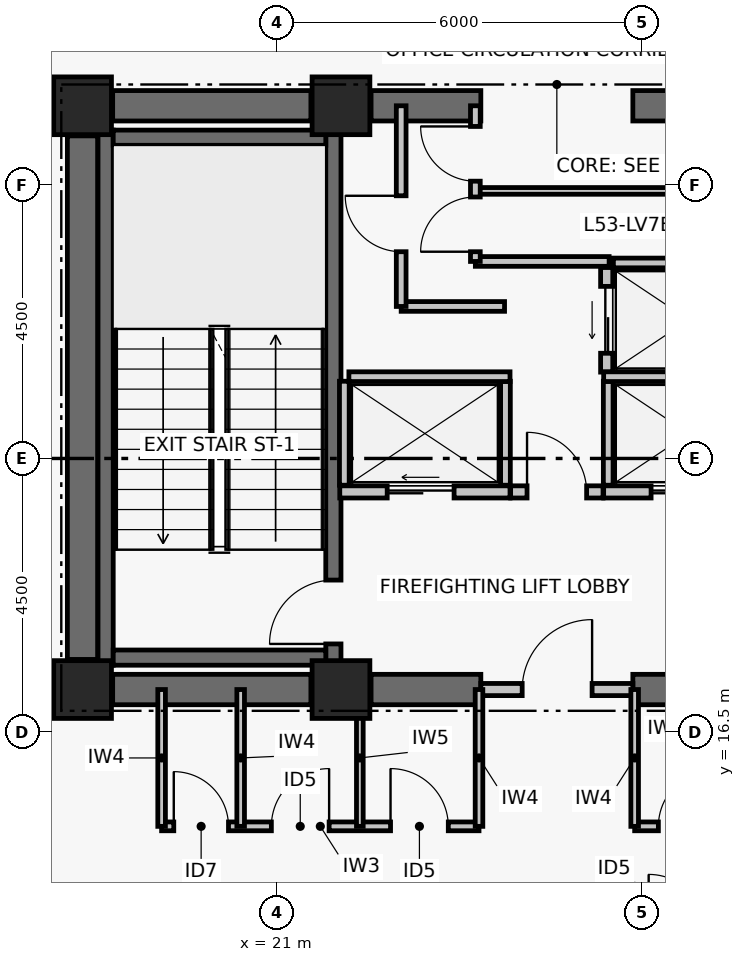
"""IFC4 building model, lengths in metres.
Left out: names, types, materials, properties, quantities, classifications, styles, units other than length and angle.
Written with IfcOpenShell. Run it as: python <this file> out.ifc"""

import sys

from ifc_helpers import new_model, si_unit, direction, frame, frame_2d, origin, origin_2d, place, context, subcontext, project, spatial, rectangle, extrude, element, fill, save


model = new_model("IFC4")
c1 = context("Model", 3, precision=1e-05, world=origin(), true_north=direction((0.0, 1.0)))
c2 = subcontext(c1, "Body", "Model", "MODEL_VIEW")
j1 = project(units=[si_unit("LENGTHUNIT", "METRE"), si_unit("PLANEANGLEUNIT", "RADIAN")], contexts=[c1])
p1 = place(None, origin())
s1 = spatial("IfcSite", under=j1, at=p1, CompositionType="ELEMENT")
p2 = place(p1, origin())
s2 = spatial("IfcBuilding", under=s1, at=p2, CompositionType="ELEMENT")
p3 = place(p2, frame((0.0, 0.0, 210.12)))
s3 = spatial("IfcBuildingStorey", under=s2, at=p3, CompositionType="ELEMENT", Elevation=210.12)
for number, where, z_axis, x_axis in (
    (1, (17.8, 17.2, 0.0), (0.0, 0.0, 1.0), (1.0, 0.0, 0.0)),
    (2, (22.05, 17.2, 0.0), (0.0, 0.0, 1.0), (1.0, 0.0, 0.0)),
    (3, (17.8, 26.8, 0.0), (0.0, 0.0, 1.0), (1.0, 0.0, 0.0)),
    (4, (22.05, 26.8, 0.0), (0.0, 0.0, 1.0), (1.0, 0.0, 0.0)),
):
    element("IfcColumn", number, at=place(p3, frame(where, z_axis=z_axis, x_axis=x_axis)), inside=s3, PredefinedType="COLUMN", context=c2, shape_type="SweptSolid", body=[
        extrude(rectangle(XDim=0.95, YDim=0.95, at=origin_2d()), origin(), (0.0, 0.0, 1.0), 3.72),
    ])
p4 = place(p3, frame((18.295, 17.2, 0.0), z_axis=(0.0, 0.0, 1.0), x_axis=(1.0, 0.0, 0.0)))
e5 = element("IfcWall", 5, at=p4, inside=s3, PredefinedType="SHEAR", context=c2, shape_type="SweptSolid", body=[
    extrude(rectangle(XDim=3.26, YDim=0.5, at=frame_2d((1.63, 0.0))), origin(), (0.0, 0.0, 1.0), 3.38),
])
p5 = place(p3, frame((22.545, 17.2, 0.0), z_axis=(0.0, 0.0, 1.0), x_axis=(1.0, 0.0, 0.0)))
e6 = element("IfcWall", 6, at=p5, inside=s3, PredefinedType="SHEAR", context=c2, shape_type="SweptSolid", body=[
    extrude(rectangle(XDim=1.805, YDim=0.5, at=frame_2d((0.903, 0.0))), origin(), (0.0, 0.0, 1.0), 3.38),
])
p6 = place(p3, frame((26.85, 17.2, 0.0), z_axis=(0.0, 0.0, 1.0), x_axis=(1.0, 0.0, 0.0)))
e7 = element("IfcWall", 7, at=p6, inside=s3, PredefinedType="SHEAR", context=c2, shape_type="SweptSolid", body=[
    extrude(rectangle(XDim=1.805, YDim=0.5, at=frame_2d((0.902, 0.0))), origin(), (0.0, 0.0, 1.0), 3.38),
])
p7 = place(p3, frame((18.295, 26.8, 0.0), z_axis=(0.0, 0.0, 1.0), x_axis=(1.0, 0.0, 0.0)))
e8 = element("IfcWall", 8, at=p7, inside=s3, PredefinedType="SHEAR", context=c2, shape_type="SweptSolid", body=[
    extrude(rectangle(XDim=3.26, YDim=0.5, at=frame_2d((1.63, 0.0))), origin(), (0.0, 0.0, 1.0), 3.38),
])
p8 = place(p3, frame((22.545, 26.8, 0.0), z_axis=(0.0, 0.0, 1.0), x_axis=(1.0, 0.0, 0.0)))
e9 = element("IfcWall", 9, at=p8, inside=s3, PredefinedType="SHEAR", context=c2, shape_type="SweptSolid", body=[
    extrude(rectangle(XDim=1.805, YDim=0.5, at=frame_2d((0.903, 0.0))), origin(), (0.0, 0.0, 1.0), 3.38),
])
p9 = place(p3, frame((26.85, 26.8, 0.0), z_axis=(0.0, 0.0, 1.0), x_axis=(1.0, 0.0, 0.0)))
e10 = element("IfcWall", 10, at=p9, inside=s3, PredefinedType="SHEAR", context=c2, shape_type="SweptSolid", body=[
    extrude(rectangle(XDim=1.805, YDim=0.5, at=frame_2d((0.902, 0.0))), origin(), (0.0, 0.0, 1.0), 3.38),
])
p10 = place(p3, frame((17.8, 17.695, 0.0), z_axis=(0.0, 0.0, 1.0), x_axis=(0.0, 1.0, 0.0)))
e11 = element("IfcWall", 11, at=p10, inside=s3, PredefinedType="SHEAR", context=c2, shape_type="SweptSolid", body=[
    extrude(rectangle(XDim=8.61, YDim=0.5, at=frame_2d((4.305, 0.0))), origin(), (0.0, 0.0, 1.0), 3.38),
])
p11 = place(p3, frame((18.179, 17.6, 0.0), z_axis=(0.0, 0.0, 1.0), x_axis=(0.0, 1.0, 0.0)))
e12 = element("IfcWall", 12, at=p11, inside=s3, PredefinedType="SHEAR", context=c2, shape_type="SweptSolid", body=[
    extrude(rectangle(XDim=8.8, YDim=0.25, at=frame_2d((4.4, 0.0))), origin(), (0.0, 0.0, 1.0), 3.38),
])
p12 = place(p3, frame((21.925, 17.6, 0.0), z_axis=(0.0, 0.0, 1.0), x_axis=(0.0, 1.0, 0.0)))
e13 = element("IfcWall", 13, at=p12, inside=s3, PredefinedType="SHEAR", context=c2, shape_type="SweptSolid", body=[
    extrude(rectangle(XDim=8.8, YDim=0.25, at=frame_2d((4.4, 0.0))), origin(), (0.0, 0.0, 1.0), 3.38),
])
p13 = place(p12, frame((0.35, 0.0, 0.0)))
e14 = element("IfcOpeningElement", 14, at=p13, cuts=e13, PredefinedType="OPENING", context=c2, shape_type="SweptSolid", body=[
    extrude(rectangle(XDim=1.05, YDim=2.08, at=frame_2d((0.525, 1.04))), frame((0.0, 0.135, 0.0), z_axis=(0.0, -1.0, 0.0), x_axis=(1.0, 0.0, 0.0)), (0.0, 0.0, 1.0), 0.27),
])
for number, where, z_axis, x_axis in (
    (15, (18.304, 17.725, 0.0), (0.0, 0.0, 1.0), (1.0, 0.0, 0.0)),
    (16, (18.304, 26.275, 0.0), (0.0, 0.0, 1.0), (1.0, 0.0, 0.0)),
):
    element("IfcWall", number, at=place(p3, frame(where, z_axis=z_axis, x_axis=x_axis)), inside=s3, PredefinedType="SHEAR", context=c2, shape_type="SweptSolid", body=[
        extrude(rectangle(XDim=3.496, YDim=0.25, at=frame_2d((1.748, 0.0))), origin(), (0.0, 0.0, 1.0), 3.38),
    ])
p14 = place(p3, frame((24.35, 17.2, 0.0), z_axis=(0.0, 0.0, 1.0), x_axis=(1.0, 0.0, 0.0)))
e17 = element("IfcWall", 17, at=p14, inside=s3, PredefinedType="PARTITIONING", context=c2, shape_type="SweptSolid", body=[
    extrude(rectangle(XDim=2.5, YDim=0.2, at=frame_2d((1.25, 0.0))), origin(), (0.0, 0.0, 1.0), 2.51),
])
p15 = place(p14, frame((0.68, 0.0, 0.0)))
e18 = element("IfcOpeningElement", 18, at=p15, cuts=e17, PredefinedType="OPENING", context=c2, shape_type="SweptSolid", body=[
    extrude(rectangle(XDim=1.15, YDim=2.08, at=frame_2d((0.575, 1.04))), frame((0.0, 0.11, 0.0), z_axis=(0.0, -1.0, 0.0), x_axis=(1.0, 0.0, 0.0)), (0.0, 0.0, 1.0), 0.22),
])
p16 = place(p3, frame((24.84, 20.45, 0.0), z_axis=(0.0, 0.0, 1.0), x_axis=(1.0, 0.0, 0.0)))
e19 = element("IfcWall", 19, at=p16, inside=s3, PredefinedType="PARTITIONING", context=c2, shape_type="SweptSolid", body=[
    extrude(rectangle(XDim=1.52, YDim=0.2, at=frame_2d((0.76, 0.0))), origin(), (0.0, 0.0, 1.0), 3.38),
])
p17 = place(p16, frame((0.27, 0.0, 0.0)))
e20 = element("IfcOpeningElement", 20, at=p17, cuts=e19, PredefinedType="OPENING", context=c2, shape_type="SweptSolid", body=[
    extrude(rectangle(XDim=0.98, YDim=2.06, at=frame_2d((0.49, 1.03))), frame((0.0, 0.11, 0.0), z_axis=(0.0, -1.0, 0.0), x_axis=(1.0, 0.0, 0.0)), (0.0, 0.0, 1.0), 0.22),
])
p18 = place(p3, frame((22.03, 20.45, 0.0), z_axis=(0.0, 0.0, 1.0), x_axis=(1.0, 0.0, 0.0)))
e21 = element("IfcWall", 21, at=p18, inside=s3, PredefinedType="PARTITIONING", context=c2, shape_type="SweptSolid", body=[
    extrude(rectangle(XDim=2.8, YDim=0.2, at=frame_2d((1.4, 0.0))), origin(), (0.0, 0.0, 1.0), 3.38),
])
p19 = place(p18, frame((0.78, 0.0, 0.0)))
e22 = element("IfcOpeningElement", 22, at=p19, cuts=e21, PredefinedType="OPENING", context=c2, shape_type="SweptSolid", body=[
    extrude(rectangle(XDim=1.1, YDim=2.08, at=frame_2d((0.55, 1.04))), frame((0.0, 0.11, 0.0), z_axis=(0.0, -1.0, 0.0), x_axis=(1.0, 0.0, 0.0)), (0.0, 0.0, 1.0), 0.22),
])
p20 = place(p3, frame((26.37, 20.45, 0.0), z_axis=(0.0, 0.0, 1.0), x_axis=(1.0, 0.0, 0.0)))
e23 = element("IfcWall", 23, at=p20, inside=s3, PredefinedType="PARTITIONING", context=c2, shape_type="SweptSolid", body=[
    extrude(rectangle(XDim=2.8, YDim=0.2, at=frame_2d((1.4, 0.0))), origin(), (0.0, 0.0, 1.0), 3.38),
])
p21 = place(p20, frame((0.78, 0.0, 0.0)))
e24 = element("IfcOpeningElement", 24, at=p21, cuts=e23, PredefinedType="OPENING", context=c2, shape_type="SweptSolid", body=[
    extrude(rectangle(XDim=1.1, YDim=2.08, at=frame_2d((0.55, 1.04))), frame((0.0, 0.11, 0.0), z_axis=(0.0, -1.0, 0.0), x_axis=(1.0, 0.0, 0.0)), (0.0, 0.0, 1.0), 0.22),
])
p22 = place(p3, frame((26.42, 22.42, 0.0), z_axis=(0.0, 0.0, 1.0), x_axis=(0.0, 1.0, 0.0)))
e25 = element("IfcWall", 25, at=p22, inside=s3, PredefinedType="PARTITIONING", context=c2, shape_type="SweptSolid", body=[
    extrude(rectangle(XDim=1.72, YDim=0.2, at=frame_2d((0.86, 0.0))), origin(), (0.0, 0.0, 1.0), 3.38),
])
p23 = place(p22, frame((0.31, 0.0, 0.0)))
e26 = element("IfcOpeningElement", 26, at=p23, cuts=e25, PredefinedType="OPENING", context=c2, shape_type="SweptSolid", body=[
    extrude(rectangle(XDim=1.1, YDim=2.08, at=frame_2d((0.55, 1.04))), frame((0.0, 0.11, 0.0), z_axis=(0.0, -1.0, 0.0), x_axis=(1.0, 0.0, 0.0)), (0.0, 0.0, 1.0), 0.22),
])
for number, where, z_axis, x_axis in (
    (27, (22.105, 20.56, 0.0), (0.0, 0.0, 1.0), (0.0, 1.0, 0.0)),
    (28, (24.755, 20.56, 0.0), (0.0, 0.0, 1.0), (0.0, 1.0, 0.0)),
):
    element("IfcWall", number, at=place(p3, frame(where, z_axis=z_axis, x_axis=x_axis)), inside=s3, PredefinedType="PARTITIONING", context=c2, shape_type="SweptSolid", body=[
        extrude(rectangle(XDim=1.71, YDim=0.16, at=frame_2d((0.855, 0.0))), origin(), (0.0, 0.0, 1.0), 3.38),
    ])
p24 = place(p3, frame((22.18, 22.345, 0.0), z_axis=(0.0, 0.0, 1.0), x_axis=(1.0, 0.0, 0.0)))
e29 = element("IfcWall", 29, at=p24, inside=s3, PredefinedType="PARTITIONING", context=c2, shape_type="SweptSolid", body=[
    extrude(rectangle(XDim=2.65, YDim=0.16, at=frame_2d((1.325, 0.0))), origin(), (0.0, 0.0, 1.0), 3.38),
])
p25 = place(p3, frame((26.445, 20.56, 0.0), z_axis=(0.0, 0.0, 1.0), x_axis=(0.0, 1.0, 0.0)))
e30 = element("IfcWall", 30, at=p25, inside=s3, PredefinedType="PARTITIONING", context=c2, shape_type="SweptSolid", body=[
    extrude(rectangle(XDim=1.71, YDim=0.16, at=frame_2d((0.855, 0.0))), origin(), (0.0, 0.0, 1.0), 3.38),
])
p26 = place(p3, frame((26.37, 22.345, 0.0), z_axis=(0.0, 0.0, 1.0), x_axis=(1.0, 0.0, 0.0)))
e31 = element("IfcWall", 31, at=p26, inside=s3, PredefinedType="PARTITIONING", context=c2, shape_type="SweptSolid", body=[
    extrude(rectangle(XDim=2.65, YDim=0.16, at=frame_2d((1.325, 0.0))), origin(), (0.0, 0.0, 1.0), 3.38),
])
p27 = place(p3, frame((26.53, 24.215, 0.0), z_axis=(0.0, 0.0, 1.0), x_axis=(1.0, 0.0, 0.0)))
e32 = element("IfcWall", 32, at=p27, inside=s3, PredefinedType="PARTITIONING", context=c2, shape_type="SweptSolid", body=[
    extrude(rectangle(XDim=2.49, YDim=0.16, at=frame_2d((1.245, 0.0))), origin(), (0.0, 0.0, 1.0), 3.38),
])
p28 = place(p3, frame((23.04, 23.5, 0.0), z_axis=(0.0, 0.0, 1.0), x_axis=(1.0, 0.0, 0.0)))
e33 = element("IfcWall", 33, at=p28, inside=s3, PredefinedType="PARTITIONING", context=c2, shape_type="SweptSolid", body=[
    extrude(rectangle(XDim=1.7, YDim=0.16, at=frame_2d((0.85, 0.0))), origin(), (0.0, 0.0, 1.0), 3.38),
])
p29 = place(p3, frame((23.04, 23.5, 0.0), z_axis=(0.0, 0.0, 1.0), x_axis=(0.0, 1.0, 0.0)))
e34 = element("IfcWall", 34, at=p29, inside=s3, PredefinedType="PARTITIONING", context=c2, shape_type="SweptSolid", body=[
    extrude(rectangle(XDim=3.3, YDim=0.16, at=frame_2d((1.65, 0.0))), origin(), (0.0, 0.0, 1.0), 2.51),
])
p30 = place(p29, frame((0.9, 0.0, 0.0)))
e35 = element("IfcOpeningElement", 35, at=p30, cuts=e34, PredefinedType="OPENING", context=c2, shape_type="SweptSolid", body=[
    extrude(rectangle(XDim=0.92, YDim=2.05, at=frame_2d((0.46, 1.025))), frame((0.0, 0.09, 0.0), z_axis=(0.0, -1.0, 0.0), x_axis=(1.0, 0.0, 0.0)), (0.0, 0.0, 1.0), 0.18),
])
p31 = place(p3, frame((24.26, 24.24, 0.0), z_axis=(0.0, 0.0, 1.0), x_axis=(1.0, 0.0, 0.0)))
e36 = element("IfcWall", 36, at=p31, inside=s3, PredefinedType="PARTITIONING", context=c2, shape_type="SweptSolid", body=[
    extrude(rectangle(XDim=2.2, YDim=0.16, at=frame_2d((1.1, 0.0))), origin(), (0.0, 0.0, 1.0), 3.38),
])
p32 = place(p3, frame((24.26, 25.4, 0.0), z_axis=(0.0, 0.0, 1.0), x_axis=(1.0, 0.0, 0.0)))
e37 = element("IfcWall", 37, at=p32, inside=s3, PredefinedType="PARTITIONING", context=c2, shape_type="SweptSolid", body=[
    extrude(rectangle(XDim=4.76, YDim=0.11, at=frame_2d((2.38, 0.0))), origin(), (0.0, 0.0, 1.0), 3.38),
])
p33 = place(p3, frame((24.26, 24.24, 0.0), z_axis=(0.0, 0.0, 1.0), x_axis=(0.0, 1.0, 0.0)))
e38 = element("IfcWall", 38, at=p33, inside=s3, PredefinedType="PARTITIONING", context=c2, shape_type="SweptSolid", body=[
    extrude(rectangle(XDim=2.56, YDim=0.16, at=frame_2d((1.28, 0.0))), origin(), (0.0, 0.0, 1.0), 2.51),
])
p34 = place(p33, frame((0.16, 0.0, 0.0)))
e39 = element("IfcOpeningElement", 39, at=p34, cuts=e38, PredefinedType="OPENING", context=c2, shape_type="SweptSolid", body=[
    extrude(rectangle(XDim=0.9, YDim=2.02, at=frame_2d((0.45, 1.01))), frame((0.0, 0.09, 0.0), z_axis=(0.0, -1.0, 0.0), x_axis=(1.0, 0.0, 0.0)), (0.0, 0.0, 1.0), 0.18),
])
p35 = place(p33, frame((1.32, 0.0, 0.0)))
e40 = element("IfcOpeningElement", 40, at=p35, cuts=e38, PredefinedType="OPENING", context=c2, shape_type="SweptSolid", body=[
    extrude(rectangle(XDim=0.9, YDim=2.02, at=frame_2d((0.45, 1.01))), frame((0.0, 0.09, 0.0), z_axis=(0.0, -1.0, 0.0), x_axis=(1.0, 0.0, 0.0)), (0.0, 0.0, 1.0), 0.18),
])
p36 = place(p3, frame((19.1, 14.95, 0.0), z_axis=(0.0, 0.0, 1.0), x_axis=(1.0, 0.0, 0.0)))
e41 = element("IfcWall", 41, at=p36, inside=s3, PredefinedType="PARTITIONING", context=c2, shape_type="SweptSolid", body=[
    extrude(rectangle(XDim=5.22, YDim=0.145, at=frame_2d((2.61, 0.0))), origin(), (0.0, 0.0, 1.0), 2.61),
])
p37 = place(p36, frame((0.2, 0.0, 0.0)))
e42 = element("IfcOpeningElement", 42, at=p37, cuts=e41, PredefinedType="OPENING", context=c2, shape_type="SweptSolid", body=[
    extrude(rectangle(XDim=0.9, YDim=2.02, at=frame_2d((0.45, 1.01))), frame((0.0, 0.083, 0.0), z_axis=(0.0, -1.0, 0.0), x_axis=(1.0, 0.0, 0.0)), (0.0, 0.0, 1.0), 0.165),
])
p38 = place(p36, frame((1.805, 0.0, 0.0)))
e43 = element("IfcOpeningElement", 43, at=p38, cuts=e41, PredefinedType="OPENING", context=c2, shape_type="SweptSolid", body=[
    extrude(rectangle(XDim=0.95, YDim=2.06, at=frame_2d((0.475, 1.03))), frame((0.0, 0.083, 0.0), z_axis=(0.0, -1.0, 0.0), x_axis=(1.0, 0.0, 0.0)), (0.0, 0.0, 1.0), 0.165),
])
p39 = place(p36, frame((3.765, 0.0, 0.0)))
e44 = element("IfcOpeningElement", 44, at=p39, cuts=e41, PredefinedType="OPENING", context=c2, shape_type="SweptSolid", body=[
    extrude(rectangle(XDim=0.95, YDim=2.06, at=frame_2d((0.475, 1.03))), frame((0.0, 0.083, 0.0), z_axis=(0.0, -1.0, 0.0), x_axis=(1.0, 0.0, 0.0)), (0.0, 0.0, 1.0), 0.165),
])
p40 = place(p3, frame((26.88, 14.95, 0.0), z_axis=(0.0, 0.0, 1.0), x_axis=(1.0, 0.0, 0.0)))
e45 = element("IfcWall", 45, at=p40, inside=s3, PredefinedType="PARTITIONING", context=c2, shape_type="SweptSolid", body=[
    extrude(rectangle(XDim=4.22, YDim=0.145, at=frame_2d((2.11, 0.0))), origin(), (0.0, 0.0, 1.0), 2.81),
])
p41 = place(p40, frame((0.39, 0.0, 0.0)))
e46 = element("IfcOpeningElement", 46, at=p41, cuts=e45, PredefinedType="OPENING", context=c2, shape_type="SweptSolid", body=[
    extrude(rectangle(XDim=0.92, YDim=2.05, at=frame_2d((0.46, 1.025))), frame((0.0, 0.083, 0.0), z_axis=(0.0, -1.0, 0.0), x_axis=(1.0, 0.0, 0.0)), (0.0, 0.0, 1.0), 0.165),
])
p42 = place(p40, frame((1.88, 0.0, 0.0)))
e47 = element("IfcOpeningElement", 47, at=p42, cuts=e45, PredefinedType="OPENING", context=c2, shape_type="SweptSolid", body=[
    extrude(rectangle(XDim=0.9, YDim=2.02, at=frame_2d((0.45, 1.01))), frame((0.0, 0.083, 0.0), z_axis=(0.0, -1.0, 0.0), x_axis=(1.0, 0.0, 0.0)), (0.0, 0.0, 1.0), 0.165),
])
p43 = place(p40, frame((3.14, 0.0, 0.0)))
e48 = element("IfcOpeningElement", 48, at=p43, cuts=e45, PredefinedType="OPENING", context=c2, shape_type="SweptSolid", body=[
    extrude(rectangle(XDim=0.9, YDim=2.02, at=frame_2d((0.45, 1.01))), frame((0.0, 0.083, 0.0), z_axis=(0.0, -1.0, 0.0), x_axis=(1.0, 0.0, 0.0)), (0.0, 0.0, 1.0), 0.165),
])
for number, where, z_axis, x_axis in (
    (49, (19.1, 14.95, 0.0), (0.0, 0.0, 1.0), (0.0, 1.0, 0.0)),
    (50, (20.4, 14.95, 0.0), (0.0, 0.0, 1.0), (0.0, 1.0, 0.0)),
):
    element("IfcWall", number, at=place(p3, frame(where, z_axis=z_axis, x_axis=x_axis)), inside=s3, PredefinedType="PARTITIONING", context=c2, shape_type="SweptSolid", body=[
        extrude(rectangle(XDim=2.25, YDim=0.125, at=frame_2d((1.125, 0.0))), origin(), (0.0, 0.0, 1.0), 2.51),
    ])
p44 = place(p3, frame((22.36, 14.95, 0.0), z_axis=(0.0, 0.0, 1.0), x_axis=(0.0, 1.0, 0.0)))
e51 = element("IfcWall", 51, at=p44, inside=s3, PredefinedType="PARTITIONING", context=c2, shape_type="SweptSolid", body=[
    extrude(rectangle(XDim=2.25, YDim=0.11, at=frame_2d((1.125, 0.0))), origin(), (0.0, 0.0, 1.0), 2.51),
])
for number, where, z_axis, x_axis in (
    (52, (24.32, 14.95, 0.0), (0.0, 0.0, 1.0), (0.0, 1.0, 0.0)),
    (53, (26.88, 14.95, 0.0), (0.0, 0.0, 1.0), (0.0, 1.0, 0.0)),
):
    element("IfcWall", number, at=place(p3, frame(where, z_axis=z_axis, x_axis=x_axis)), inside=s3, PredefinedType="PARTITIONING", context=c2, shape_type="SweptSolid", body=[
        extrude(rectangle(XDim=2.25, YDim=0.125, at=frame_2d((1.125, 0.0))), origin(), (0.0, 0.0, 1.0), 2.51),
    ])
p45 = place(p13, origin())
e54 = element("IfcDoor", 54, at=p45, inside=s3, OperationType="SINGLE_SWING_LEFT", PredefinedType="DOOR", context=c2, shape_type="SweptSolid", body=[
    extrude(rectangle(XDim=1.05, YDim=2.08, at=frame_2d((0.525, 1.04))), frame((0.0, 0.025, 0.0), z_axis=(0.0, -1.0, 0.0), x_axis=(1.0, 0.0, 0.0)), (0.0, 0.0, 1.0), 0.05),
])
fill(e14, e54)
p46 = place(p15, origin())
e55 = element("IfcDoor", 55, at=p46, inside=s3, OperationType="SINGLE_SWING_RIGHT", PredefinedType="DOOR", context=c2, shape_type="SweptSolid", body=[
    extrude(rectangle(XDim=1.15, YDim=2.08, at=frame_2d((0.575, 1.04))), frame((0.0, 0.025, 0.0), z_axis=(0.0, -1.0, 0.0), x_axis=(1.0, 0.0, 0.0)), (0.0, 0.0, 1.0), 0.05),
])
fill(e18, e55)
p47 = place(p17, origin())
e56 = element("IfcDoor", 56, at=p47, inside=s3, OperationType="SINGLE_SWING_LEFT", PredefinedType="DOOR", context=c2, shape_type="SweptSolid", body=[
    extrude(rectangle(XDim=0.98, YDim=2.06, at=frame_2d((0.49, 1.03))), frame((0.0, 0.025, 0.0), z_axis=(0.0, -1.0, 0.0), x_axis=(1.0, 0.0, 0.0)), (0.0, 0.0, 1.0), 0.05),
])
fill(e20, e56)
p48 = place(p19, origin())
e57 = element("IfcDoor", 57, at=p48, inside=s3, OperationType="DOUBLE_DOOR_SLIDING", PredefinedType="DOOR", context=c2, shape_type="SweptSolid", body=[
    extrude(rectangle(XDim=1.1, YDim=2.08, at=frame_2d((0.55, 1.04))), frame((0.0, 0.025, 0.0), z_axis=(0.0, -1.0, 0.0), x_axis=(1.0, 0.0, 0.0)), (0.0, 0.0, 1.0), 0.05),
])
fill(e22, e57)
p49 = place(p21, origin())
e58 = element("IfcDoor", 58, at=p49, inside=s3, OperationType="DOUBLE_DOOR_SLIDING", PredefinedType="DOOR", context=c2, shape_type="SweptSolid", body=[
    extrude(rectangle(XDim=1.1, YDim=2.08, at=frame_2d((0.55, 1.04))), frame((0.0, 0.025, 0.0), z_axis=(0.0, -1.0, 0.0), x_axis=(1.0, 0.0, 0.0)), (0.0, 0.0, 1.0), 0.05),
])
fill(e24, e58)
p50 = place(p23, origin())
e59 = element("IfcDoor", 59, at=p50, inside=s3, OperationType="DOUBLE_DOOR_SLIDING", PredefinedType="DOOR", context=c2, shape_type="SweptSolid", body=[
    extrude(rectangle(XDim=1.1, YDim=2.08, at=frame_2d((0.55, 1.04))), frame((0.0, 0.025, 0.0), z_axis=(0.0, -1.0, 0.0), x_axis=(1.0, 0.0, 0.0)), (0.0, 0.0, 1.0), 0.05),
])
fill(e26, e59)
p51 = place(p30, origin())
e60 = element("IfcDoor", 60, at=p51, inside=s3, OperationType="SINGLE_SWING_RIGHT", PredefinedType="DOOR", context=c2, shape_type="SweptSolid", body=[
    extrude(rectangle(XDim=0.92, YDim=2.05, at=frame_2d((0.46, 1.025))), frame((0.0, 0.025, 0.0), z_axis=(0.0, -1.0, 0.0), x_axis=(1.0, 0.0, 0.0)), (0.0, 0.0, 1.0), 0.05),
])
fill(e35, e60)
p52 = place(p34, origin())
e61 = element("IfcDoor", 61, at=p52, inside=s3, OperationType="SINGLE_SWING_LEFT", PredefinedType="DOOR", context=c2, shape_type="SweptSolid", body=[
    extrude(rectangle(XDim=0.9, YDim=2.02, at=frame_2d((0.45, 1.01))), frame((0.0, 0.025, 0.0), z_axis=(0.0, -1.0, 0.0), x_axis=(1.0, 0.0, 0.0)), (0.0, 0.0, 1.0), 0.05),
])
fill(e39, e61)
p53 = place(p35, origin())
e62 = element("IfcDoor", 62, at=p53, inside=s3, OperationType="SINGLE_SWING_RIGHT", PredefinedType="DOOR", context=c2, shape_type="SweptSolid", body=[
    extrude(rectangle(XDim=0.9, YDim=2.02, at=frame_2d((0.45, 1.01))), frame((0.0, 0.025, 0.0), z_axis=(0.0, -1.0, 0.0), x_axis=(1.0, 0.0, 0.0)), (0.0, 0.0, 1.0), 0.05),
])
fill(e40, e62)
p54 = place(p37, origin())
e63 = element("IfcDoor", 63, at=p54, inside=s3, OperationType="SINGLE_SWING_LEFT", PredefinedType="DOOR", context=c2, shape_type="SweptSolid", body=[
    extrude(rectangle(XDim=0.9, YDim=2.02, at=frame_2d((0.45, 1.01))), frame((0.0, 0.025, 0.0), z_axis=(0.0, -1.0, 0.0), x_axis=(1.0, 0.0, 0.0)), (0.0, 0.0, 1.0), 0.05),
])
fill(e42, e63)
p55 = place(p38, origin())
e64 = element("IfcDoor", 64, at=p55, inside=s3, OperationType="SINGLE_SWING_RIGHT", PredefinedType="DOOR", context=c2, shape_type="SweptSolid", body=[
    extrude(rectangle(XDim=0.95, YDim=2.06, at=frame_2d((0.475, 1.03))), frame((0.0, 0.025, 0.0), z_axis=(0.0, -1.0, 0.0), x_axis=(1.0, 0.0, 0.0)), (0.0, 0.0, 1.0), 0.05),
])
fill(e43, e64)
p56 = place(p39, origin())
e65 = element("IfcDoor", 65, at=p56, inside=s3, OperationType="SINGLE_SWING_LEFT", PredefinedType="DOOR", context=c2, shape_type="SweptSolid", body=[
    extrude(rectangle(XDim=0.95, YDim=2.06, at=frame_2d((0.475, 1.03))), frame((0.0, 0.025, 0.0), z_axis=(0.0, -1.0, 0.0), x_axis=(1.0, 0.0, 0.0)), (0.0, 0.0, 1.0), 0.05),
])
fill(e44, e65)
p57 = place(p41, origin())
e66 = element("IfcDoor", 66, at=p57, inside=s3, OperationType="SINGLE_SWING_RIGHT", PredefinedType="DOOR", context=c2, shape_type="SweptSolid", body=[
    extrude(rectangle(XDim=0.92, YDim=2.05, at=frame_2d((0.46, 1.025))), frame((0.0, 0.025, 0.0), z_axis=(0.0, -1.0, 0.0), x_axis=(1.0, 0.0, 0.0)), (0.0, 0.0, 1.0), 0.05),
])
fill(e46, e66)
save(model, sys.argv[1])
